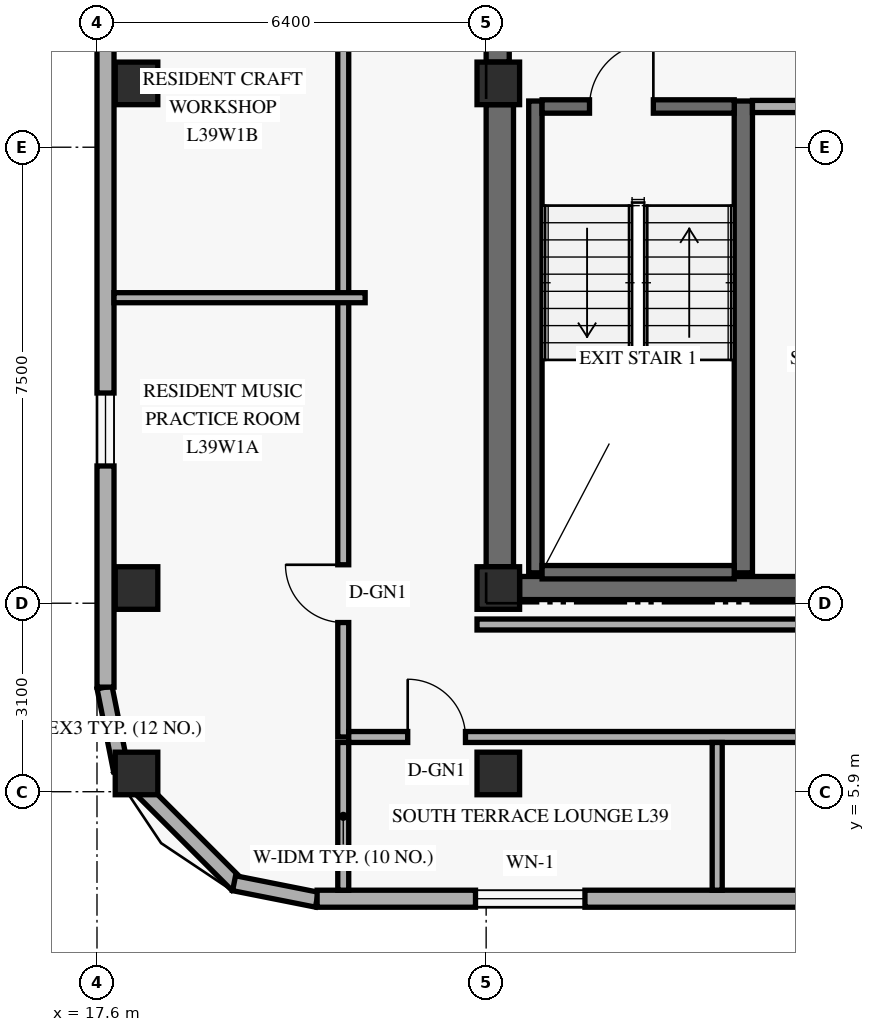
"""IFC4 building model, lengths in metres.
Left out: names, types, materials, properties, quantities, classifications, styles, units other than length and angle.
Written with IfcOpenShell. Run it as: python <this file> out.ifc"""

import sys

from ifc_helpers import new_model, si_unit, direction, frame, frame_2d, origin, origin_2d, place, context, subcontext, project, spatial, rectangle, extrude, element, fill, save


model = new_model("IFC4")
c1 = context("Model", 3, precision=1e-05, world=origin(), true_north=direction((0.0, 1.0)))
c2 = subcontext(c1, "Body", "Model", "MODEL_VIEW")
j1 = project(units=[si_unit("LENGTHUNIT", "METRE"), si_unit("PLANEANGLEUNIT", "RADIAN")], contexts=[c1])
p1 = place(None, origin())
s1 = spatial("IfcSite", under=j1, at=p1, CompositionType="ELEMENT")
p2 = place(p1, origin())
s2 = spatial("IfcBuilding", under=s1, at=p2, CompositionType="ELEMENT")
p3 = place(p2, frame((0.0, 0.0, 151.8)))
s3 = spatial("IfcBuildingStorey", under=s2, at=p3, CompositionType="ELEMENT", Elevation=151.8)
p4 = place(p3, frame((24.225, 9.6, 0.0), z_axis=(0.0, 0.0, 1.0), x_axis=(0.0, 1.0, 0.0)))
e1 = element("IfcWall", 1, at=p4, inside=s3, PredefinedType="SHEAR", context=c2, shape_type="SweptSolid", body=[
    extrude(rectangle(XDim=7.6, YDim=0.45, at=frame_2d((3.8, 0.0))), origin(), (0.0, 0.0, 1.0), 2.748),
])
p5 = place(p3, frame((24.19, 17.9, 0.0), z_axis=(0.0, 0.0, 1.0), x_axis=(0.0, 1.0, 0.0)))
e2 = element("IfcWall", 2, at=p5, inside=s3, PredefinedType="SHEAR", context=c2, shape_type="SweptSolid", body=[
    extrude(rectangle(XDim=11.95, YDim=0.38, at=frame_2d((5.975, 0.0))), origin(), (0.0, 0.0, 1.0), 2.748),
])
p6 = place(p3, frame((24.55, 9.25, 0.0), z_axis=(0.0, 0.0, 1.0), x_axis=(1.0, 0.0, 0.0)))
e3 = element("IfcWall", 3, at=p6, inside=s3, PredefinedType="SHEAR", context=c2, shape_type="SweptSolid", body=[
    extrude(rectangle(XDim=10.3, YDim=0.38, at=frame_2d((5.15, 0.0))), origin(), (0.0, 0.0, 1.0), 3.36),
])
p7 = place(p6, frame((5.2, 0.0, 0.0)))
e4 = element("IfcOpeningElement", 4, at=p7, cuts=e3, PredefinedType="OPENING", context=c2, shape_type="SweptSolid", body=[
    extrude(rectangle(XDim=1.05, YDim=2.15, at=frame_2d((0.525, 1.075))), frame((0.0, 0.2, 0.0), z_axis=(0.0, -1.0, 0.0), x_axis=(1.0, 0.0, 0.0)), (0.0, 0.0, 1.0), 0.4),
])
p8 = place(p3, frame((24.81, 9.5, 0.0), z_axis=(0.0, 0.0, 1.0), x_axis=(0.0, 1.0, 0.0)))
e5 = element("IfcWall", 5, at=p8, inside=s3, PredefinedType="SHEAR", context=c2, shape_type="SweptSolid", body=[
    extrude(rectangle(XDim=7.76, YDim=0.22, at=frame_2d((3.88, 0.0))), origin(), (0.0, 0.0, 1.0), 3.36),
])
p9 = place(p3, frame((28.23, 9.5, 0.0), z_axis=(0.0, 0.0, 1.0), x_axis=(0.0, 1.0, 0.0)))
e6 = element("IfcWall", 6, at=p9, inside=s3, PredefinedType="SHEAR", context=c2, shape_type="SweptSolid", body=[
    extrude(rectangle(XDim=7.76, YDim=0.3, at=frame_2d((3.88, 0.0))), origin(), (0.0, 0.0, 1.0), 3.36),
])
p10 = place(p3, frame((24.92, 9.51, 0.0), z_axis=(0.0, 0.0, 1.0), x_axis=(1.0, 0.0, 0.0)))
e7 = element("IfcWall", 7, at=p10, inside=s3, PredefinedType="SHEAR", context=c2, shape_type="SweptSolid", body=[
    extrude(rectangle(XDim=3.16, YDim=0.22, at=frame_2d((1.58, 0.0))), origin(), (0.0, 0.0, 1.0), 3.36),
])
p11 = place(p3, frame((24.92, 17.17, 0.0), z_axis=(0.0, 0.0, 1.0), x_axis=(1.0, 0.0, 0.0)))
e8 = element("IfcWall", 8, at=p11, inside=s3, PredefinedType="SHEAR", context=c2, shape_type="SweptSolid", body=[
    extrude(rectangle(XDim=3.16, YDim=0.22, at=frame_2d((1.58, 0.0))), origin(), (0.0, 0.0, 1.0), 3.36),
])
p12 = place(p11, frame((0.78, 0.0, 0.0)))
e9 = element("IfcOpeningElement", 9, at=p12, cuts=e8, PredefinedType="OPENING", context=c2, shape_type="SweptSolid", body=[
    extrude(rectangle(XDim=1.05, YDim=2.15, at=frame_2d((0.525, 1.075))), frame((0.0, 0.12, 0.0), z_axis=(0.0, -1.0, 0.0), x_axis=(1.0, 0.0, 0.0)), (0.0, 0.0, 1.0), 0.24),
])
for number, where, z_axis, x_axis in (
    (10, (18.25, 6.2, 0.0), (0.0, 0.0, 1.0), (1.0, 0.0, 0.0)),
    (11, (18.25, 9.25, 0.0), (0.0, 0.0, 1.0), (1.0, 0.0, 0.0)),
    (12, (18.25, 17.55, 0.0), (0.0, 0.0, 1.0), (1.0, 0.0, 0.0)),
    (13, (24.2, 6.2, 0.0), (0.0, 0.0, 1.0), (1.0, 0.0, 0.0)),
    (14, (24.2, 9.25, 0.0), (0.0, 0.0, 1.0), (1.0, 0.0, 0.0)),
    (15, (24.2, 17.55, 0.0), (0.0, 0.0, 1.0), (1.0, 0.0, 0.0)),
):
    element("IfcColumn", number, at=place(p3, frame(where, z_axis=z_axis, x_axis=x_axis)), inside=s3, PredefinedType="COLUMN", context=c2, shape_type="SweptSolid", body=[
        extrude(rectangle(XDim=0.7, YDim=0.7, at=origin_2d()), origin(), (0.0, 0.0, 1.0), 3.6),
    ])
p13 = place(p3, frame((17.724, 7.616, 0.0), z_axis=(0.0, 0.0, 1.0), x_axis=(0.195135625965, -0.9807762678, 0.0)))
e16 = element("IfcWall", 16, at=p13, inside=s3, PredefinedType="SOLIDWALL", context=c2, shape_type="SweptSolid", body=[
    extrude(rectangle(XDim=1.389, YDim=0.25, at=frame_2d((0.694, 0.0))), origin(), (0.0, 0.0, 1.0), 3.36),
])
p14 = place(p3, frame((17.968, 6.305, 0.0), z_axis=(0.0, 0.0, 1.0), x_axis=(0.707106781187, -0.707106781187, 0.0)))
e17 = element("IfcWall", 17, at=p14, inside=s3, PredefinedType="SOLIDWALL", context=c2, shape_type="SweptSolid", body=[
    extrude(rectangle(XDim=2.739, YDim=0.25, at=frame_2d((1.37, 0.0))), origin(), (0.0, 0.0, 1.0), 3.36),
])
p15 = place(p3, frame((19.854, 4.395, 0.0), z_axis=(0.0, 0.0, 1.0), x_axis=(0.980809899341, -0.19496651342, 0.0)))
e18 = element("IfcWall", 18, at=p15, inside=s3, PredefinedType="SOLIDWALL", context=c2, shape_type="SweptSolid", body=[
    extrude(rectangle(XDim=1.389, YDim=0.25, at=frame_2d((0.694, 0.0))), origin(), (0.0, 0.0, 1.0), 3.36),
])
p16 = place(p3, frame((21.22, 4.14, 0.0), z_axis=(0.0, 0.0, 1.0), x_axis=(1.0, 0.0, 0.0)))
e19 = element("IfcWall", 19, at=p16, inside=s3, PredefinedType="SOLIDWALL", context=c2, shape_type="SweptSolid", body=[
    extrude(rectangle(XDim=33.76, YDim=0.28, at=frame_2d((16.88, 0.0))), origin(), (0.0, 0.0, 1.0), 3.36),
])
p17 = place(p16, frame((2.605, 0.0, 0.85)))
e20 = element("IfcOpeningElement", 20, at=p17, cuts=e19, PredefinedType="OPENING", context=c2, shape_type="SweptSolid", body=[
    extrude(rectangle(XDim=1.8, YDim=1.6, at=frame_2d((0.9, 0.8))), frame((0.0, 0.15, 0.0), z_axis=(0.0, -1.0, 0.0), x_axis=(1.0, 0.0, 0.0)), (0.0, 0.0, 1.0), 0.3),
])
p18 = place(p16, frame((9.49, 0.0, 0.85)))
e21 = element("IfcOpeningElement", 21, at=p18, cuts=e19, PredefinedType="OPENING", context=c2, shape_type="SweptSolid", body=[
    extrude(rectangle(XDim=1.8, YDim=1.6, at=frame_2d((0.9, 0.8))), frame((0.0, 0.15, 0.0), z_axis=(0.0, -1.0, 0.0), x_axis=(1.0, 0.0, 0.0)), (0.0, 0.0, 1.0), 0.3),
])
p19 = place(p16, frame((14.765, 0.0, 0.85)))
e22 = element("IfcOpeningElement", 22, at=p19, cuts=e19, PredefinedType="OPENING", context=c2, shape_type="SweptSolid", body=[
    extrude(rectangle(XDim=1.8, YDim=1.6, at=frame_2d((0.9, 0.8))), frame((0.0, 0.15, 0.0), z_axis=(0.0, -1.0, 0.0), x_axis=(1.0, 0.0, 0.0)), (0.0, 0.0, 1.0), 0.3),
])
p20 = place(p16, frame((19.325, 0.0, 0.85)))
e23 = element("IfcOpeningElement", 23, at=p20, cuts=e19, PredefinedType="OPENING", context=c2, shape_type="SweptSolid", body=[
    extrude(rectangle(XDim=1.8, YDim=1.6, at=frame_2d((0.9, 0.8))), frame((0.0, 0.15, 0.0), z_axis=(0.0, -1.0, 0.0), x_axis=(1.0, 0.0, 0.0)), (0.0, 0.0, 1.0), 0.3),
])
p21 = place(p16, frame((24.15, 0.0, 0.85)))
e24 = element("IfcOpeningElement", 24, at=p21, cuts=e19, PredefinedType="OPENING", context=c2, shape_type="SweptSolid", body=[
    extrude(rectangle(XDim=1.8, YDim=1.6, at=frame_2d((0.9, 0.8))), frame((0.0, 0.15, 0.0), z_axis=(0.0, -1.0, 0.0), x_axis=(1.0, 0.0, 0.0)), (0.0, 0.0, 1.0), 0.3),
])
p22 = place(p16, frame((27.08, 0.0, 0.85)))
e25 = element("IfcOpeningElement", 25, at=p22, cuts=e19, PredefinedType="OPENING", context=c2, shape_type="SweptSolid", body=[
    extrude(rectangle(XDim=1.2, YDim=1.5, at=frame_2d((0.6, 0.75))), frame((0.0, 0.15, 0.0), z_axis=(0.0, -1.0, 0.0), x_axis=(1.0, 0.0, 0.0)), (0.0, 0.0, 1.0), 0.3),
])
p23 = place(p16, frame((30.27, 0.0, 0.85)))
e26 = element("IfcOpeningElement", 26, at=p23, cuts=e19, PredefinedType="OPENING", context=c2, shape_type="SweptSolid", body=[
    extrude(rectangle(XDim=1.8, YDim=1.6, at=frame_2d((0.9, 0.8))), frame((0.0, 0.15, 0.0), z_axis=(0.0, -1.0, 0.0), x_axis=(1.0, 0.0, 0.0)), (0.0, 0.0, 1.0), 0.3),
])
p24 = place(p3, frame((17.74, 40.38, 0.0), z_axis=(0.0, 0.0, 1.0), x_axis=(0.0, -1.0, 0.0)))
e27 = element("IfcWall", 27, at=p24, inside=s3, PredefinedType="SOLIDWALL", context=c2, shape_type="SweptSolid", body=[
    extrude(rectangle(XDim=32.76, YDim=0.28, at=frame_2d((16.38, 0.0))), origin(), (0.0, 0.0, 1.0), 3.36),
])
p25 = place(p24, frame((27.923, 0.0, 0.85)))
e28 = element("IfcOpeningElement", 28, at=p25, cuts=e27, PredefinedType="OPENING", context=c2, shape_type="SweptSolid", body=[
    extrude(rectangle(XDim=1.2, YDim=1.5, at=frame_2d((0.6, 0.75))), frame((0.0, 0.15, 0.0), z_axis=(0.0, -1.0, 0.0), x_axis=(1.0, 0.0, 0.0)), (0.0, 0.0, 1.0), 0.3),
])
p26 = place(p24, frame((18.385, 0.0, 0.85)))
e29 = element("IfcOpeningElement", 29, at=p26, cuts=e27, PredefinedType="OPENING", context=c2, shape_type="SweptSolid", body=[
    extrude(rectangle(XDim=1.2, YDim=1.5, at=frame_2d((0.6, 0.75))), frame((0.0, 0.15, 0.0), z_axis=(0.0, -1.0, 0.0), x_axis=(1.0, 0.0, 0.0)), (0.0, 0.0, 1.0), 0.3),
])
p27 = place(p24, frame((12.5, 0.0, 0.85)))
e30 = element("IfcOpeningElement", 30, at=p27, cuts=e27, PredefinedType="OPENING", context=c2, shape_type="SweptSolid", body=[
    extrude(rectangle(XDim=1.2, YDim=1.5, at=frame_2d((0.6, 0.75))), frame((0.0, 0.15, 0.0), z_axis=(0.0, -1.0, 0.0), x_axis=(1.0, 0.0, 0.0)), (0.0, 0.0, 1.0), 0.3),
])
p28 = place(p24, frame((3.462, 0.0, 0.85)))
e31 = element("IfcOpeningElement", 31, at=p28, cuts=e27, PredefinedType="OPENING", context=c2, shape_type="SweptSolid", body=[
    extrude(rectangle(XDim=1.2, YDim=1.5, at=frame_2d((0.6, 0.75))), frame((0.0, 0.15, 0.0), z_axis=(0.0, -1.0, 0.0), x_axis=(1.0, 0.0, 0.0)), (0.0, 0.0, 1.0), 0.3),
])
p29 = place(p3, frame((28.38, 17.17, 0.0), z_axis=(0.0, 0.0, 1.0), x_axis=(1.0, 0.0, 0.0)))
e32 = element("IfcWall", 32, at=p29, inside=s3, PredefinedType="STANDARD", context=c2, shape_type="SweptSolid", body=[
    extrude(rectangle(XDim=2.9, YDim=0.2, at=frame_2d((1.45, 0.0))), origin(), (0.0, 0.0, 1.0), 3.36),
])
p30 = place(p3, frame((21.65, 6.8, 0.0), z_axis=(0.0, 0.0, 1.0), x_axis=(0.0, 1.0, 0.0)))
e33 = element("IfcWall", 33, at=p30, inside=s3, PredefinedType="STANDARD", context=c2, shape_type="SweptSolid", body=[
    extrude(rectangle(XDim=34.4, YDim=0.18, at=frame_2d((17.2, 0.0))), origin(), (0.0, 0.0, 1.0), 2.73),
])
p31 = place(p30, frame((1.883, 0.0, 0.0)))
e34 = element("IfcOpeningElement", 34, at=p31, cuts=e33, PredefinedType="OPENING", context=c2, shape_type="SweptSolid", body=[
    extrude(rectangle(XDim=0.95, YDim=2.15, at=frame_2d((0.475, 1.075))), frame((0.0, 0.1, 0.0), z_axis=(0.0, -1.0, 0.0), x_axis=(1.0, 0.0, 0.0)), (0.0, 0.0, 1.0), 0.2),
])
p32 = place(p30, frame((12.117, 0.0, 0.0)))
e35 = element("IfcOpeningElement", 35, at=p32, cuts=e33, PredefinedType="OPENING", context=c2, shape_type="SweptSolid", body=[
    extrude(rectangle(XDim=0.95, YDim=2.15, at=frame_2d((0.475, 1.075))), frame((0.0, 0.1, 0.0), z_axis=(0.0, -1.0, 0.0), x_axis=(1.0, 0.0, 0.0)), (0.0, 0.0, 1.0), 0.2),
])
p33 = place(p30, frame((22.357, 0.0, 0.0)))
e36 = element("IfcOpeningElement", 36, at=p33, cuts=e33, PredefinedType="OPENING", context=c2, shape_type="SweptSolid", body=[
    extrude(rectangle(XDim=0.95, YDim=2.15, at=frame_2d((0.475, 1.075))), frame((0.0, 0.1, 0.0), z_axis=(0.0, -1.0, 0.0), x_axis=(1.0, 0.0, 0.0)), (0.0, 0.0, 1.0), 0.2),
])
p34 = place(p30, frame((31.792, 0.0, 0.0)))
e37 = element("IfcOpeningElement", 37, at=p34, cuts=e33, PredefinedType="OPENING", context=c2, shape_type="SweptSolid", body=[
    extrude(rectangle(XDim=0.95, YDim=2.15, at=frame_2d((0.475, 1.075))), frame((0.0, 0.1, 0.0), z_axis=(0.0, -1.0, 0.0), x_axis=(1.0, 0.0, 0.0)), (0.0, 0.0, 1.0), 0.2),
])
p35 = place(p3, frame((21.74, 6.8, 0.0), z_axis=(0.0, 0.0, 1.0), x_axis=(1.0, 0.0, 0.0)))
e38 = element("IfcWall", 38, at=p35, inside=s3, PredefinedType="STANDARD", context=c2, shape_type="SweptSolid", body=[
    extrude(rectangle(XDim=13.68, YDim=0.18, at=frame_2d((6.84, 0.0))), origin(), (0.0, 0.0, 1.0), 2.73),
])
p36 = place(p35, frame((0.97, 0.0, 0.0)))
e39 = element("IfcOpeningElement", 39, at=p36, cuts=e38, PredefinedType="OPENING", context=c2, shape_type="SweptSolid", body=[
    extrude(rectangle(XDim=0.95, YDim=2.15, at=frame_2d((0.475, 1.075))), frame((0.0, 0.1, 0.0), z_axis=(0.0, -1.0, 0.0), x_axis=(1.0, 0.0, 0.0)), (0.0, 0.0, 1.0), 0.2),
])
p37 = place(p35, frame((9.11, 0.0, 0.0)))
e40 = element("IfcOpeningElement", 40, at=p37, cuts=e38, PredefinedType="OPENING", context=c2, shape_type="SweptSolid", body=[
    extrude(rectangle(XDim=0.95, YDim=2.15, at=frame_2d((0.475, 1.075))), frame((0.0, 0.1, 0.0), z_axis=(0.0, -1.0, 0.0), x_axis=(1.0, 0.0, 0.0)), (0.0, 0.0, 1.0), 0.2),
])
p38 = place(p3, frame((23.85, 8.65, 0.0), z_axis=(0.0, 0.0, 1.0), x_axis=(1.0, 0.0, 0.0)))
e41 = element("IfcWall", 41, at=p38, inside=s3, PredefinedType="STANDARD", context=c2, shape_type="SweptSolid", body=[
    extrude(rectangle(XDim=11.57, YDim=0.18, at=frame_2d((5.785, 0.0))), origin(), (0.0, 0.0, 1.0), 2.73),
])
p39 = place(p3, frame((21.65, 4.28, 0.0), z_axis=(0.0, 0.0, 1.0), x_axis=(0.0, 1.0, 0.0)))
e42 = element("IfcWall", 42, at=p39, inside=s3, PredefinedType="PARTITIONING", context=c2, shape_type="SweptSolid", body=[
    extrude(rectangle(XDim=2.43, YDim=0.18, at=frame_2d((1.215, 0.0))), origin(), (0.0, 0.0, 1.0), 2.879),
])
p40 = place(p3, frame((17.88, 14.025, 0.0), z_axis=(0.0, 0.0, 1.0), x_axis=(1.0, 0.0, 0.0)))
e43 = element("IfcWall", 43, at=p40, inside=s3, PredefinedType="PARTITIONING", context=c2, shape_type="SweptSolid", body=[
    extrude(rectangle(XDim=4.13, YDim=0.165, at=frame_2d((2.065, 0.0))), origin(), (0.0, 0.0, 1.0), 2.879),
])
p41 = place(p3, frame((27.8, 4.28, 0.0), z_axis=(0.0, 0.0, 1.0), x_axis=(0.0, 1.0, 0.0)))
e44 = element("IfcWall", 44, at=p41, inside=s3, PredefinedType="PARTITIONING", context=c2, shape_type="SweptSolid", body=[
    extrude(rectangle(XDim=2.43, YDim=0.165, at=frame_2d((1.215, 0.0))), origin(), (0.0, 0.0, 1.0), 2.879),
])
p42 = place(p17, origin())
e45 = element("IfcWindow", 45, at=p42, inside=s3, PartitioningType="SINGLE_PANEL", PredefinedType="WINDOW", context=c2, shape_type="SweptSolid", body=[
    extrude(rectangle(XDim=1.8, YDim=1.6, at=frame_2d((0.9, 0.8))), frame((0.0, 0.03, 0.0), z_axis=(0.0, -1.0, 0.0), x_axis=(1.0, 0.0, 0.0)), (0.0, 0.0, 1.0), 0.06),
])
fill(e20, e45)
p43 = place(p25, origin())
e46 = element("IfcWindow", 46, at=p43, inside=s3, PartitioningType="SINGLE_PANEL", PredefinedType="WINDOW", context=c2, shape_type="SweptSolid", body=[
    extrude(rectangle(XDim=1.2, YDim=1.5, at=frame_2d((0.6, 0.75))), frame((0.0, 0.03, 0.0), z_axis=(0.0, -1.0, 0.0), x_axis=(1.0, 0.0, 0.0)), (0.0, 0.0, 1.0), 0.06),
])
fill(e28, e46)
p44 = place(p12, frame((1.05, 0.0, 0.0), z_axis=(0.0, 0.0, 1.0), x_axis=(-1.0, 0.0, 0.0)))
e47 = element("IfcDoor", 47, at=p44, inside=s3, OperationType="SINGLE_SWING_LEFT", PredefinedType="DOOR", context=c2, shape_type="SweptSolid", body=[
    extrude(rectangle(XDim=1.05, YDim=2.15, at=frame_2d((0.525, 1.075))), frame((0.0, 0.025, 0.0), z_axis=(0.0, -1.0, 0.0), x_axis=(1.0, 0.0, 0.0)), (0.0, 0.0, 1.0), 0.05),
])
fill(e9, e47)
p45 = place(p31, origin())
e48 = element("IfcDoor", 48, at=p45, inside=s3, OperationType="SINGLE_SWING_RIGHT", PredefinedType="DOOR", context=c2, shape_type="SweptSolid", body=[
    extrude(rectangle(XDim=0.95, YDim=2.15, at=frame_2d((0.475, 1.075))), frame((0.0, 0.025, 0.0), z_axis=(0.0, -1.0, 0.0), x_axis=(1.0, 0.0, 0.0)), (0.0, 0.0, 1.0), 0.05),
])
fill(e34, e48)
p46 = place(p36, origin())
e49 = element("IfcDoor", 49, at=p46, inside=s3, OperationType="SINGLE_SWING_LEFT", PredefinedType="DOOR", context=c2, shape_type="SweptSolid", body=[
    extrude(rectangle(XDim=0.95, YDim=2.15, at=frame_2d((0.475, 1.075))), frame((0.0, 0.025, 0.0), z_axis=(0.0, -1.0, 0.0), x_axis=(1.0, 0.0, 0.0)), (0.0, 0.0, 1.0), 0.05),
])
fill(e39, e49)
save(model, sys.argv[1])
